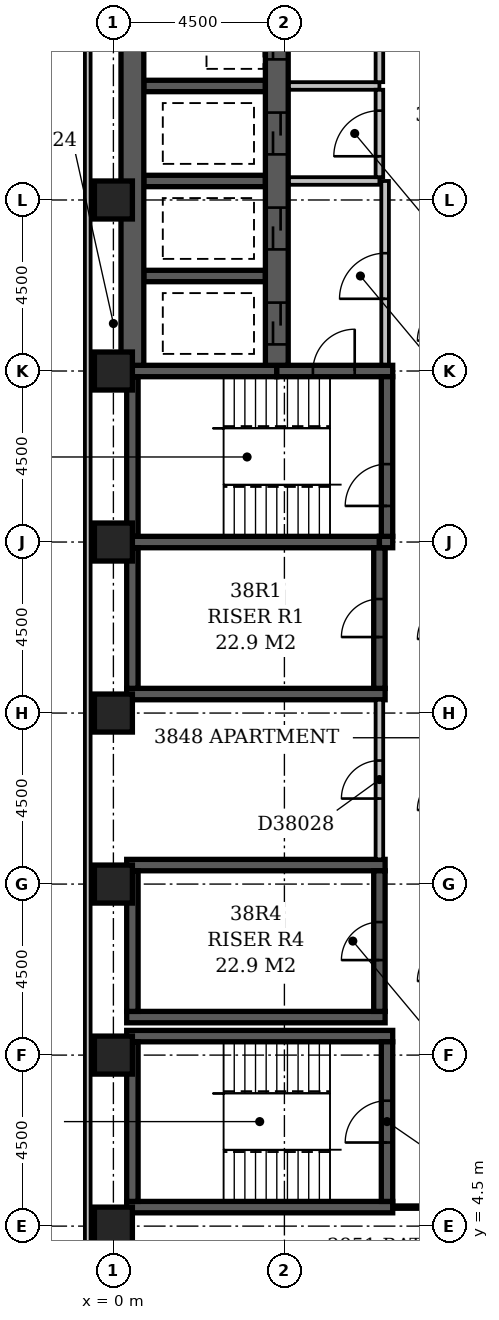
"""IFC4 building model, lengths in metres.
Left out: names, types, materials, properties, quantities, classifications, styles, units other than length and angle.
Written with IfcOpenShell. Run it as: python <this file> out.ifc"""

import sys

from ifc_helpers import new_model, si_unit, direction, frame, frame_2d, origin, origin_2d, place, context, subcontext, project, spatial, rectangle, extrude, element, fill, save


model = new_model("IFC4")
c1 = context("Model", 3, precision=1e-05, world=origin(), true_north=direction((0.0, 1.0)))
c2 = subcontext(c1, "Body", "Model", "MODEL_VIEW")
j1 = project(units=[si_unit("LENGTHUNIT", "METRE"), si_unit("PLANEANGLEUNIT", "RADIAN")], contexts=[c1])
p1 = place(None, origin())
s1 = spatial("IfcSite", under=j1, at=p1, CompositionType="ELEMENT")
p2 = place(p1, origin())
s2 = spatial("IfcBuilding", under=s1, at=p2, CompositionType="ELEMENT")
p3 = place(p2, frame((0.0, 0.0, 152.0)))
s3 = spatial("IfcBuildingStorey", under=s2, at=p3, CompositionType="ELEMENT", Elevation=152.0)
for number, where, z_axis, x_axis in (
    (1, (0.35, 5.0, -0.3), (0.0, 0.0, 1.0), (1.0, 0.0, 0.0)),
    (2, (0.35, 9.5, -0.3), (0.0, 0.0, 1.0), (1.0, 0.0, 0.0)),
):
    element("IfcWall", number, at=place(p3, frame(where, z_axis=z_axis, x_axis=x_axis)), inside=s3, PredefinedType="SHEAR", context=c2, shape_type="SweptSolid", body=[
        extrude(rectangle(XDim=7.0, YDim=0.3, at=frame_2d((3.5, 0.0))), origin(), (0.0, 0.0, 1.0), 3.6),
    ])
for number, where, z_axis, x_axis in (
    (3, (0.35, 10.0, -0.3), (0.0, 0.0, 1.0), (1.0, 0.0, 0.0)),
    (4, (0.35, 14.0, -0.3), (0.0, 0.0, 1.0), (1.0, 0.0, 0.0)),
    (5, (0.35, 18.5, -0.3), (0.0, 0.0, 1.0), (1.0, 0.0, 0.0)),
):
    element("IfcWall", number, at=place(p3, frame(where, z_axis=z_axis, x_axis=x_axis)), inside=s3, PredefinedType="SHEAR", context=c2, shape_type="SweptSolid", body=[
        extrude(rectangle(XDim=6.8, YDim=0.3, at=frame_2d((3.4, 0.0))), origin(), (0.0, 0.0, 1.0), 3.6),
    ])
p4 = place(p3, frame((0.35, 22.5, -0.3), z_axis=(0.0, 0.0, 1.0), x_axis=(1.0, 0.0, 0.0)))
e6 = element("IfcWall", 6, at=p4, inside=s3, PredefinedType="SHEAR", context=c2, shape_type="SweptSolid", body=[
    extrude(rectangle(XDim=6.65, YDim=0.3, at=frame_2d((3.325, 0.0))), origin(), (0.0, 0.0, 1.0), 3.6),
])
p5 = place(p3, frame((0.35, 27.0, -0.3), z_axis=(0.0, 0.0, 1.0), x_axis=(1.0, 0.0, 0.0)))
e7 = element("IfcWall", 7, at=p5, inside=s3, PredefinedType="SHEAR", context=c2, shape_type="SweptSolid", body=[
    extrude(rectangle(XDim=3.95, YDim=0.3, at=frame_2d((1.975, 0.0))), origin(), (0.0, 0.0, 1.0), 3.6),
])
p6 = place(p3, frame((0.5, 5.15, -0.3), z_axis=(0.0, 0.0, 1.0), x_axis=(0.0, 1.0, 0.0)))
e8 = element("IfcWall", 8, at=p6, inside=s3, PredefinedType="SHEAR", context=c2, shape_type="SweptSolid", body=[
    extrude(rectangle(XDim=4.2, YDim=0.3, at=frame_2d((2.1, 0.0))), origin(), (0.0, 0.0, 1.0), 3.6),
])
for number, where, z_axis, x_axis in (
    (9, (0.5, 10.15, -0.3), (0.0, 0.0, 1.0), (0.0, 1.0, 0.0)),
    (10, (0.5, 18.65, -0.3), (0.0, 0.0, 1.0), (0.0, 1.0, 0.0)),
):
    element("IfcWall", number, at=place(p3, frame(where, z_axis=z_axis, x_axis=x_axis)), inside=s3, PredefinedType="SHEAR", context=c2, shape_type="SweptSolid", body=[
        extrude(rectangle(XDim=3.7, YDim=0.3, at=frame_2d((1.85, 0.0))), origin(), (0.0, 0.0, 1.0), 3.6),
    ])
p7 = place(p3, frame((0.5, 22.65, -0.3), z_axis=(0.0, 0.0, 1.0), x_axis=(0.0, 1.0, 0.0)))
e11 = element("IfcWall", 11, at=p7, inside=s3, PredefinedType="SHEAR", context=c2, shape_type="SweptSolid", body=[
    extrude(rectangle(XDim=4.2, YDim=0.3, at=frame_2d((2.1, 0.0))), origin(), (0.0, 0.0, 1.0), 3.6),
])
p8 = place(p3, frame((0.5, 27.15, -0.3), z_axis=(0.0, 0.0, 1.0), x_axis=(0.0, 1.0, 0.0)))
e12 = element("IfcWall", 12, at=p8, inside=s3, PredefinedType="SHEAR", context=c2, shape_type="SweptSolid", body=[
    extrude(rectangle(XDim=22.05, YDim=0.6, at=frame_2d((11.025, 0.0))), origin(), (0.0, 0.0, 1.0), 3.6),
])
for number, where, z_axis, x_axis in (
    (13, (0.8, 29.5, -0.3), (0.0, 0.0, 1.0), (1.0, 0.0, 0.0)),
    (14, (0.8, 32.0, -0.3), (0.0, 0.0, 1.0), (1.0, 0.0, 0.0)),
    (15, (0.8, 34.5, -0.3), (0.0, 0.0, 1.0), (1.0, 0.0, 0.0)),
):
    element("IfcWall", number, at=place(p3, frame(where, z_axis=z_axis, x_axis=x_axis)), inside=s3, PredefinedType="SHEAR", context=c2, shape_type="SweptSolid", body=[
        extrude(rectangle(XDim=3.2, YDim=0.3, at=frame_2d((1.6, 0.0))), origin(), (0.0, 0.0, 1.0), 3.6),
    ])
p9 = place(p3, frame((4.3, 27.0, -0.3), z_axis=(0.0, 0.0, 1.0), x_axis=(1.0, 0.0, 0.0)))
e16 = element("IfcWall", 16, at=p9, inside=s3, PredefinedType="SHEAR", context=c2, shape_type="SweptSolid", body=[
    extrude(rectangle(XDim=3.05, YDim=0.3, at=frame_2d((1.525, 0.0))), origin(), (0.0, 0.0, 1.0), 3.6),
])
p10 = place(p9, frame((0.95, 0.0, 0.3)))
e17 = element("IfcOpeningElement", 17, at=p10, cuts=e16, PredefinedType="OPENING", context=c2, shape_type="SweptSolid", body=[
    extrude(rectangle(XDim=1.1, YDim=2.1, at=frame_2d((0.55, 1.05))), frame((0.0, 0.162, 0.0), z_axis=(0.0, -1.0, 0.0), x_axis=(1.0, 0.0, 0.0)), (0.0, 0.0, 1.0), 0.324),
])
p11 = place(p3, frame((4.3, 27.15, -0.3), z_axis=(0.0, 0.0, 1.0), x_axis=(0.0, 1.0, 0.0)))
e18 = element("IfcWall", 18, at=p11, inside=s3, PredefinedType="SHEAR", context=c2, shape_type="SweptSolid", body=[
    extrude(rectangle(XDim=22.05, YDim=0.6, at=frame_2d((11.025, 0.0))), origin(), (0.0, 0.0, 1.0), 3.6),
])
p12 = place(p11, frame((3.05, 0.0, 0.3)))
e19 = element("IfcOpeningElement", 19, at=p12, cuts=e18, PredefinedType="OPENING", context=c2, shape_type="SweptSolid", body=[
    extrude(rectangle(XDim=1.1, YDim=2.1, at=frame_2d((0.55, 1.05))), frame((0.0, 0.312, 0.0), z_axis=(0.0, -1.0, 0.0), x_axis=(1.0, 0.0, 0.0)), (0.0, 0.0, 1.0), 0.624),
])
p13 = place(p11, frame((0.55, 0.0, 0.3)))
e20 = element("IfcOpeningElement", 20, at=p13, cuts=e18, PredefinedType="OPENING", context=c2, shape_type="SweptSolid", body=[
    extrude(rectangle(XDim=1.1, YDim=2.1, at=frame_2d((0.55, 1.05))), frame((0.0, 0.312, 0.0), z_axis=(0.0, -1.0, 0.0), x_axis=(1.0, 0.0, 0.0)), (0.0, 0.0, 1.0), 0.624),
])
p14 = place(p11, frame((20.55, 0.0, 0.3)))
e21 = element("IfcOpeningElement", 21, at=p14, cuts=e18, PredefinedType="OPENING", context=c2, shape_type="SweptSolid", body=[
    extrude(rectangle(XDim=1.1, YDim=2.1, at=frame_2d((0.55, 1.05))), frame((0.0, 0.312, 0.0), z_axis=(0.0, -1.0, 0.0), x_axis=(1.0, 0.0, 0.0)), (0.0, 0.0, 1.0), 0.624),
])
p15 = place(p11, frame((18.05, 0.0, 0.3)))
e22 = element("IfcOpeningElement", 22, at=p15, cuts=e18, PredefinedType="OPENING", context=c2, shape_type="SweptSolid", body=[
    extrude(rectangle(XDim=1.1, YDim=2.1, at=frame_2d((0.55, 1.05))), frame((0.0, 0.312, 0.0), z_axis=(0.0, -1.0, 0.0), x_axis=(1.0, 0.0, 0.0)), (0.0, 0.0, 1.0), 0.624),
])
p16 = place(p11, frame((15.55, 0.0, 0.3)))
e23 = element("IfcOpeningElement", 23, at=p16, cuts=e18, PredefinedType="OPENING", context=c2, shape_type="SweptSolid", body=[
    extrude(rectangle(XDim=1.1, YDim=2.1, at=frame_2d((0.55, 1.05))), frame((0.0, 0.312, 0.0), z_axis=(0.0, -1.0, 0.0), x_axis=(1.0, 0.0, 0.0)), (0.0, 0.0, 1.0), 0.624),
])
p17 = place(p11, frame((13.05, 0.0, 0.3)))
e24 = element("IfcOpeningElement", 24, at=p17, cuts=e18, PredefinedType="OPENING", context=c2, shape_type="SweptSolid", body=[
    extrude(rectangle(XDim=1.1, YDim=2.1, at=frame_2d((0.55, 1.05))), frame((0.0, 0.312, 0.0), z_axis=(0.0, -1.0, 0.0), x_axis=(1.0, 0.0, 0.0)), (0.0, 0.0, 1.0), 0.624),
])
p18 = place(p11, frame((10.55, 0.0, 0.3)))
e25 = element("IfcOpeningElement", 25, at=p18, cuts=e18, PredefinedType="OPENING", context=c2, shape_type="SweptSolid", body=[
    extrude(rectangle(XDim=1.1, YDim=2.1, at=frame_2d((0.55, 1.05))), frame((0.0, 0.312, 0.0), z_axis=(0.0, -1.0, 0.0), x_axis=(1.0, 0.0, 0.0)), (0.0, 0.0, 1.0), 0.624),
])
p19 = place(p11, frame((8.05, 0.0, 0.3)))
e26 = element("IfcOpeningElement", 26, at=p19, cuts=e18, PredefinedType="OPENING", context=c2, shape_type="SweptSolid", body=[
    extrude(rectangle(XDim=1.1, YDim=2.1, at=frame_2d((0.55, 1.05))), frame((0.0, 0.312, 0.0), z_axis=(0.0, -1.0, 0.0), x_axis=(1.0, 0.0, 0.0)), (0.0, 0.0, 1.0), 0.624),
])
p20 = place(p11, frame((5.55, 0.0, 0.3)))
e27 = element("IfcOpeningElement", 27, at=p20, cuts=e18, PredefinedType="OPENING", context=c2, shape_type="SweptSolid", body=[
    extrude(rectangle(XDim=1.1, YDim=2.1, at=frame_2d((0.55, 1.05))), frame((0.0, 0.312, 0.0), z_axis=(0.0, -1.0, 0.0), x_axis=(1.0, 0.0, 0.0)), (0.0, 0.0, 1.0), 0.624),
])
p21 = place(p3, frame((7.0, 10.15, -0.3), z_axis=(0.0, 0.0, 1.0), x_axis=(0.0, 1.0, 0.0)))
e28 = element("IfcWall", 28, at=p21, inside=s3, PredefinedType="SHEAR", context=c2, shape_type="SweptSolid", body=[
    extrude(rectangle(XDim=3.7, YDim=0.3, at=frame_2d((1.85, 0.0))), origin(), (0.0, 0.0, 1.0), 3.6),
])
p22 = place(p21, frame((1.35, 0.0, 0.3)))
e29 = element("IfcOpeningElement", 29, at=p22, cuts=e28, PredefinedType="OPENING", context=c2, shape_type="SweptSolid", body=[
    extrude(rectangle(XDim=1.0, YDim=2.1, at=frame_2d((0.5, 1.05))), frame((0.0, 0.162, 0.0), z_axis=(0.0, -1.0, 0.0), x_axis=(1.0, 0.0, 0.0)), (0.0, 0.0, 1.0), 0.324),
])
p23 = place(p3, frame((7.0, 18.65, -0.3), z_axis=(0.0, 0.0, 1.0), x_axis=(0.0, 1.0, 0.0)))
e30 = element("IfcWall", 30, at=p23, inside=s3, PredefinedType="SHEAR", context=c2, shape_type="SweptSolid", body=[
    extrude(rectangle(XDim=3.7, YDim=0.3, at=frame_2d((1.85, 0.0))), origin(), (0.0, 0.0, 1.0), 3.6),
])
p24 = place(p23, frame((1.35, 0.0, 0.3)))
e31 = element("IfcOpeningElement", 31, at=p24, cuts=e30, PredefinedType="OPENING", context=c2, shape_type="SweptSolid", body=[
    extrude(rectangle(XDim=1.0, YDim=2.1, at=frame_2d((0.5, 1.05))), frame((0.0, 0.162, 0.0), z_axis=(0.0, -1.0, 0.0), x_axis=(1.0, 0.0, 0.0)), (0.0, 0.0, 1.0), 0.324),
])
p25 = place(p3, frame((7.0, 22.5, -0.3), z_axis=(0.0, 0.0, 1.0), x_axis=(1.0, 0.0, 0.0)))
e32 = element("IfcWall", 32, at=p25, inside=s3, PredefinedType="SHEAR", context=c2, shape_type="SweptSolid", body=[
    extrude(rectangle(XDim=0.35, YDim=0.3, at=frame_2d((0.175, 0.0))), origin(), (0.0, 0.0, 1.0), 3.6),
])
p26 = place(p3, frame((7.2, 5.15, -0.3), z_axis=(0.0, 0.0, 1.0), x_axis=(0.0, 1.0, 0.0)))
e33 = element("IfcWall", 33, at=p26, inside=s3, PredefinedType="SHEAR", context=c2, shape_type="SweptSolid", body=[
    extrude(rectangle(XDim=4.2, YDim=0.3, at=frame_2d((2.1, 0.0))), origin(), (0.0, 0.0, 1.0), 3.6),
])
p27 = place(p26, frame((1.55, 0.0, 0.3)))
e34 = element("IfcOpeningElement", 34, at=p27, cuts=e33, PredefinedType="OPENING", context=c2, shape_type="SweptSolid", body=[
    extrude(rectangle(XDim=1.1, YDim=2.1, at=frame_2d((0.55, 1.05))), frame((0.0, 0.162, 0.0), z_axis=(0.0, -1.0, 0.0), x_axis=(1.0, 0.0, 0.0)), (0.0, 0.0, 1.0), 0.324),
])
p28 = place(p3, frame((7.2, 22.65, -0.3), z_axis=(0.0, 0.0, 1.0), x_axis=(0.0, 1.0, 0.0)))
e35 = element("IfcWall", 35, at=p28, inside=s3, PredefinedType="SHEAR", context=c2, shape_type="SweptSolid", body=[
    extrude(rectangle(XDim=4.2, YDim=0.3, at=frame_2d((2.1, 0.0))), origin(), (0.0, 0.0, 1.0), 3.6),
])
p29 = place(p28, frame((0.8, 0.0, 0.3)))
e36 = element("IfcOpeningElement", 36, at=p29, cuts=e35, PredefinedType="OPENING", context=c2, shape_type="SweptSolid", body=[
    extrude(rectangle(XDim=1.1, YDim=2.1, at=frame_2d((0.55, 1.05))), frame((0.0, 0.162, 0.0), z_axis=(0.0, -1.0, 0.0), x_axis=(1.0, 0.0, 0.0)), (0.0, 0.0, 1.0), 0.324),
])
for number, where, z_axis, x_axis in (
    (37, (0.0, 4.5, -0.3), (0.0, 0.0, 1.0), (1.0, 0.0, 0.0)),
    (38, (0.0, 9.0, -0.3), (0.0, 0.0, 1.0), (1.0, 0.0, 0.0)),
    (39, (0.0, 13.5, -0.3), (0.0, 0.0, 1.0), (1.0, 0.0, 0.0)),
    (40, (0.0, 18.0, -0.3), (0.0, 0.0, 1.0), (1.0, 0.0, 0.0)),
    (41, (0.0, 22.5, -0.3), (0.0, 0.0, 1.0), (1.0, 0.0, 0.0)),
    (42, (0.0, 27.0, -0.3), (0.0, 0.0, 1.0), (1.0, 0.0, 0.0)),
    (43, (0.0, 31.5, -0.3), (0.0, 0.0, 1.0), (1.0, 0.0, 0.0)),
):
    element("IfcColumn", number, at=place(p3, frame(where, z_axis=z_axis, x_axis=x_axis)), inside=s3, PredefinedType="COLUMN", context=c2, shape_type="SweptSolid", body=[
        extrude(rectangle(XDim=1.0, YDim=1.0, at=origin_2d()), origin(), (0.0, 0.0, 1.0), 3.6),
    ])
p30 = place(p3, frame((-0.675, 59.1, 0.0), z_axis=(0.0, 0.0, 1.0), x_axis=(0.0, -1.0, 0.0)))
e44 = element("IfcWall", 44, at=p30, inside=s3, PredefinedType="STANDARD", context=c2, shape_type="SweptSolid", body=[
    extrude(rectangle(XDim=55.35, YDim=0.15, at=frame_2d((27.675, 0.0))), origin(), (0.0, 0.0, 1.0), 2.7),
])
p31 = place(p3, frame((4.62, 34.5, 0.0), z_axis=(0.0, 0.0, 1.0), x_axis=(1.0, 0.0, 0.0)))
e45 = element("IfcWall", 45, at=p31, inside=s3, PredefinedType="PARTITIONING", context=c2, shape_type="SweptSolid", body=[
    extrude(rectangle(XDim=2.38, YDim=0.2, at=frame_2d((1.19, 0.0))), origin(), (0.0, 0.0, 1.0), 3.3),
])
p32 = place(p3, frame((7.0, 34.6, 0.0), z_axis=(0.0, 0.0, 1.0), x_axis=(0.0, 1.0, 0.0)))
e46 = element("IfcWall", 46, at=p32, inside=s3, PredefinedType="PARTITIONING", context=c2, shape_type="SweptSolid", body=[
    extrude(rectangle(XDim=14.9, YDim=0.2, at=frame_2d((7.45, 0.0))), origin(), (0.0, 0.0, 1.0), 3.3),
])
p33 = place(p32, frame((2.8, 0.0, 0.0)))
e47 = element("IfcOpeningElement", 47, at=p33, cuts=e46, PredefinedType="OPENING", context=c2, shape_type="SweptSolid", body=[
    extrude(rectangle(XDim=1.2, YDim=2.1, at=frame_2d((0.6, 1.05))), frame((0.0, 0.112, 0.0), z_axis=(0.0, -1.0, 0.0), x_axis=(1.0, 0.0, 0.0)), (0.0, 0.0, 1.0), 0.224),
])
p34 = place(p32, frame((9.8, 0.0, 0.0)))
e48 = element("IfcOpeningElement", 48, at=p34, cuts=e46, PredefinedType="OPENING", context=c2, shape_type="SweptSolid", body=[
    extrude(rectangle(XDim=1.2, YDim=2.1, at=frame_2d((0.6, 1.05))), frame((0.0, 0.112, 0.0), z_axis=(0.0, -1.0, 0.0), x_axis=(1.0, 0.0, 0.0)), (0.0, 0.0, 1.0), 0.224),
])
p35 = place(p3, frame((4.62, 32.0, 0.0), z_axis=(0.0, 0.0, 1.0), x_axis=(1.0, 0.0, 0.0)))
e49 = element("IfcWall", 49, at=p35, inside=s3, PredefinedType="PARTITIONING", context=c2, shape_type="SweptSolid", body=[
    extrude(rectangle(XDim=2.38, YDim=0.2, at=frame_2d((1.19, 0.0))), origin(), (0.0, 0.0, 1.0), 3.3),
])
p36 = place(p3, frame((7.0, 32.1, 0.0), z_axis=(0.0, 0.0, 1.0), x_axis=(0.0, 1.0, 0.0)))
e50 = element("IfcWall", 50, at=p36, inside=s3, PredefinedType="PARTITIONING", context=c2, shape_type="SweptSolid", body=[
    extrude(rectangle(XDim=2.3, YDim=0.2, at=frame_2d((1.15, 0.0))), origin(), (0.0, 0.0, 1.0), 3.3),
])
p37 = place(p36, frame((0.55, 0.0, 0.0)))
e51 = element("IfcOpeningElement", 51, at=p37, cuts=e50, PredefinedType="OPENING", context=c2, shape_type="SweptSolid", body=[
    extrude(rectangle(XDim=1.2, YDim=2.1, at=frame_2d((0.6, 1.05))), frame((0.0, 0.112, 0.0), z_axis=(0.0, -1.0, 0.0), x_axis=(1.0, 0.0, 0.0)), (0.0, 0.0, 1.0), 0.224),
])
p38 = place(p3, frame((7.15, 27.17, 0.0), z_axis=(0.0, 0.0, 1.0), x_axis=(0.0, 1.0, 0.0)))
e52 = element("IfcWall", 52, at=p38, inside=s3, PredefinedType="PARTITIONING", context=c2, shape_type="SweptSolid", body=[
    extrude(rectangle(XDim=4.83, YDim=0.2, at=frame_2d((2.415, 0.0))), origin(), (0.0, 0.0, 1.0), 3.3),
])
p39 = place(p38, frame((1.73, 0.0, 0.0)))
e53 = element("IfcOpeningElement", 53, at=p39, cuts=e52, PredefinedType="OPENING", context=c2, shape_type="SweptSolid", body=[
    extrude(rectangle(XDim=1.2, YDim=2.1, at=frame_2d((0.6, 1.05))), frame((0.0, 0.112, 0.0), z_axis=(0.0, -1.0, 0.0), x_axis=(1.0, 0.0, 0.0)), (0.0, 0.0, 1.0), 0.224),
])
p40 = place(p3, frame((0.0, 4.5, 0.0), z_axis=(0.0, 0.0, 1.0), x_axis=(0.0, 1.0, 0.0)))
e54 = element("IfcWall", 54, at=p40, inside=s3, PredefinedType="PARTITIONING", context=c2, shape_type="SweptSolid", body=[
    extrude(rectangle(XDim=0.5, YDim=0.1, at=frame_2d((0.25, 0.0))), origin(), (0.0, 0.0, 1.0), 2.7),
])
p41 = place(p3, frame((7.349, 5.0, 0.0), z_axis=(0.0, 0.0, 1.0), x_axis=(1.0, 0.0, 0.0)))
e55 = element("IfcWall", 55, at=p41, inside=s3, PredefinedType="PARTITIONING", context=c2, shape_type="SweptSolid", body=[
    extrude(rectangle(XDim=1.551, YDim=0.1, at=frame_2d((0.775, 0.0))), origin(), (0.0, 0.0, 1.0), 3.3),
])
p42 = place(p3, frame((7.0, 14.15, 0.0), z_axis=(0.0, 0.0, 1.0), x_axis=(0.0, 1.0, 0.0)))
e56 = element("IfcWall", 56, at=p42, inside=s3, PredefinedType="PARTITIONING", context=c2, shape_type="SweptSolid", body=[
    extrude(rectangle(XDim=4.2, YDim=0.2, at=frame_2d((2.1, 0.0))), origin(), (0.0, 0.0, 1.0), 3.3),
])
p43 = place(p42, frame((1.6, 0.0, 0.0)))
e57 = element("IfcOpeningElement", 57, at=p43, cuts=e56, PredefinedType="OPENING", context=c2, shape_type="SweptSolid", body=[
    extrude(rectangle(XDim=1.0, YDim=2.1, at=frame_2d((0.5, 1.05))), frame((0.0, 0.112, 0.0), z_axis=(0.0, -1.0, 0.0), x_axis=(1.0, 0.0, 0.0)), (0.0, 0.0, 1.0), 0.224),
])
p44 = place(p39, origin())
e58 = element("IfcDoor", 58, at=p44, inside=s3, OperationType="SINGLE_SWING_LEFT", PredefinedType="DOOR", context=c2, shape_type="SweptSolid", body=[
    extrude(rectangle(XDim=1.2, YDim=2.1, at=frame_2d((0.6, 1.05))), frame((0.0, 0.025, 0.0), z_axis=(0.0, -1.0, 0.0), x_axis=(1.0, 0.0, 0.0)), (0.0, 0.0, 1.0), 0.05),
])
fill(e53, e58)
p45 = place(p12, origin())
e59 = element("IfcDoor", 59, at=p45, inside=s3, OperationType="SLIDING_TO_LEFT", PredefinedType="DOOR", context=c2, shape_type="SweptSolid", body=[
    extrude(rectangle(XDim=1.1, YDim=2.1, at=frame_2d((0.55, 1.05))), frame((0.0, 0.025, 0.0), z_axis=(0.0, -1.0, 0.0), x_axis=(1.0, 0.0, 0.0)), (0.0, 0.0, 1.0), 0.05),
])
fill(e19, e59)
p46 = place(p13, origin())
e60 = element("IfcDoor", 60, at=p46, inside=s3, OperationType="SLIDING_TO_LEFT", PredefinedType="DOOR", context=c2, shape_type="SweptSolid", body=[
    extrude(rectangle(XDim=1.1, YDim=2.1, at=frame_2d((0.55, 1.05))), frame((0.0, 0.025, 0.0), z_axis=(0.0, -1.0, 0.0), x_axis=(1.0, 0.0, 0.0)), (0.0, 0.0, 1.0), 0.05),
])
fill(e20, e60)
p47 = place(p19, origin())
e61 = element("IfcDoor", 61, at=p47, inside=s3, OperationType="SLIDING_TO_LEFT", PredefinedType="DOOR", context=c2, shape_type="SweptSolid", body=[
    extrude(rectangle(XDim=1.1, YDim=2.1, at=frame_2d((0.55, 1.05))), frame((0.0, 0.025, 0.0), z_axis=(0.0, -1.0, 0.0), x_axis=(1.0, 0.0, 0.0)), (0.0, 0.0, 1.0), 0.05),
])
fill(e26, e61)
p48 = place(p37, origin())
e62 = element("IfcDoor", 62, at=p48, inside=s3, OperationType="SINGLE_SWING_LEFT", PredefinedType="DOOR", context=c2, shape_type="SweptSolid", body=[
    extrude(rectangle(XDim=1.2, YDim=2.1, at=frame_2d((0.6, 1.05))), frame((0.0, 0.025, 0.0), z_axis=(0.0, -1.0, 0.0), x_axis=(1.0, 0.0, 0.0)), (0.0, 0.0, 1.0), 0.05),
])
fill(e51, e62)
p49 = place(p20, origin())
e63 = element("IfcDoor", 63, at=p49, inside=s3, OperationType="SLIDING_TO_LEFT", PredefinedType="DOOR", context=c2, shape_type="SweptSolid", body=[
    extrude(rectangle(XDim=1.1, YDim=2.1, at=frame_2d((0.55, 1.05))), frame((0.0, 0.025, 0.0), z_axis=(0.0, -1.0, 0.0), x_axis=(1.0, 0.0, 0.0)), (0.0, 0.0, 1.0), 0.05),
])
fill(e27, e63)
p50 = place(p24, origin())
e64 = element("IfcDoor", 64, at=p50, inside=s3, OperationType="SINGLE_SWING_LEFT", PredefinedType="DOOR", context=c2, shape_type="SweptSolid", body=[
    extrude(rectangle(XDim=1.0, YDim=2.1, at=frame_2d((0.5, 1.05))), frame((0.0, 0.025, 0.0), z_axis=(0.0, -1.0, 0.0), x_axis=(1.0, 0.0, 0.0)), (0.0, 0.0, 1.0), 0.05),
])
fill(e31, e64)
p51 = place(p22, origin())
e65 = element("IfcDoor", 65, at=p51, inside=s3, OperationType="SINGLE_SWING_LEFT", PredefinedType="DOOR", context=c2, shape_type="SweptSolid", body=[
    extrude(rectangle(XDim=1.0, YDim=2.1, at=frame_2d((0.5, 1.05))), frame((0.0, 0.025, 0.0), z_axis=(0.0, -1.0, 0.0), x_axis=(1.0, 0.0, 0.0)), (0.0, 0.0, 1.0), 0.05),
])
fill(e29, e65)
p52 = place(p10, frame((1.1, 0.0, 0.0), z_axis=(0.0, 0.0, 1.0), x_axis=(-1.0, 0.0, 0.0)))
e66 = element("IfcDoor", 66, at=p52, inside=s3, OperationType="SINGLE_SWING_LEFT", PredefinedType="DOOR", context=c2, shape_type="SweptSolid", body=[
    extrude(rectangle(XDim=1.1, YDim=2.1, at=frame_2d((0.55, 1.05))), frame((0.0, 0.025, 0.0), z_axis=(0.0, -1.0, 0.0), x_axis=(1.0, 0.0, 0.0)), (0.0, 0.0, 1.0), 0.05),
])
fill(e17, e66)
p53 = place(p29, origin())
e67 = element("IfcDoor", 67, at=p53, inside=s3, OperationType="SINGLE_SWING_LEFT", PredefinedType="DOOR", context=c2, shape_type="SweptSolid", body=[
    extrude(rectangle(XDim=1.1, YDim=2.1, at=frame_2d((0.55, 1.05))), frame((0.0, 0.025, 0.0), z_axis=(0.0, -1.0, 0.0), x_axis=(1.0, 0.0, 0.0)), (0.0, 0.0, 1.0), 0.05),
])
fill(e36, e67)
p54 = place(p27, origin())
e68 = element("IfcDoor", 68, at=p54, inside=s3, OperationType="SINGLE_SWING_LEFT", PredefinedType="DOOR", context=c2, shape_type="SweptSolid", body=[
    extrude(rectangle(XDim=1.1, YDim=2.1, at=frame_2d((0.55, 1.05))), frame((0.0, 0.025, 0.0), z_axis=(0.0, -1.0, 0.0), x_axis=(1.0, 0.0, 0.0)), (0.0, 0.0, 1.0), 0.05),
])
fill(e34, e68)
p55 = place(p43, origin())
e69 = element("IfcDoor", 69, at=p55, inside=s3, OperationType="SINGLE_SWING_LEFT", PredefinedType="DOOR", context=c2, shape_type="SweptSolid", body=[
    extrude(rectangle(XDim=1.0, YDim=2.1, at=frame_2d((0.5, 1.05))), frame((0.0, 0.025, 0.0), z_axis=(0.0, -1.0, 0.0), x_axis=(1.0, 0.0, 0.0)), (0.0, 0.0, 1.0), 0.05),
])
fill(e57, e69)
save(model, sys.argv[1])
